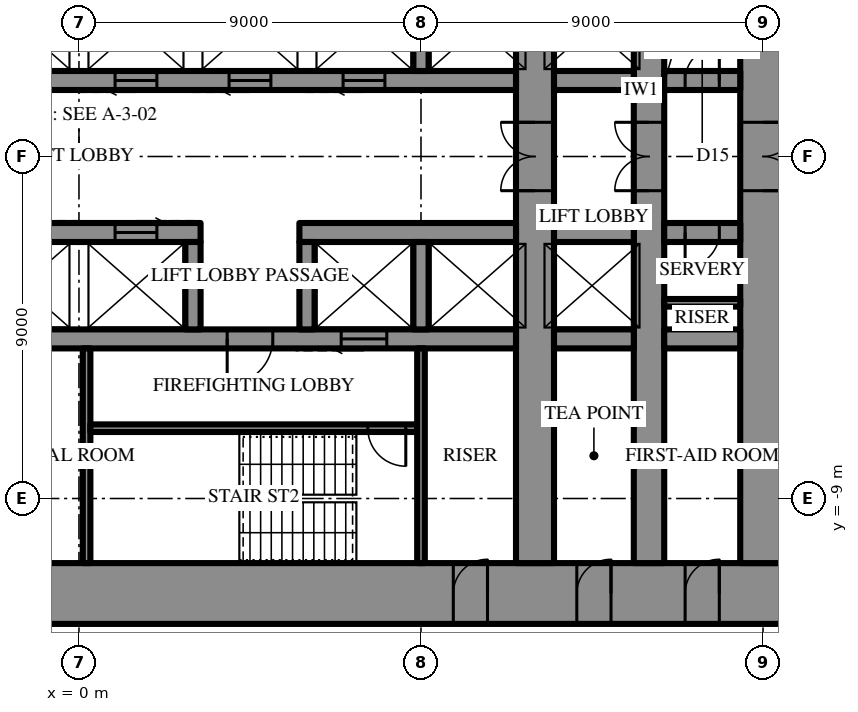
"""IFC4 building model, lengths in metres.
Left out: names, types, materials, properties, quantities, classifications, styles, units other than length and angle.
Written with IfcOpenShell. Run it as: python <this file> out.ifc"""

import sys

from ifc_helpers import new_model, si_unit, direction, frame, frame_2d, origin, place, context, subcontext, project, spatial, rectangle, extrude, element, fill, save


model = new_model("IFC4")
c1 = context("Model", 3, precision=1e-05, world=origin(), true_north=direction((0.0, 1.0)))
c2 = subcontext(c1, "Body", "Model", "MODEL_VIEW")
j1 = project(units=[si_unit("LENGTHUNIT", "METRE"), si_unit("PLANEANGLEUNIT", "RADIAN")], contexts=[c1])
p1 = place(None, origin())
s1 = spatial("IfcSite", under=j1, at=p1, CompositionType="ELEMENT")
p2 = place(p1, origin())
s2 = spatial("IfcBuilding", under=s1, at=p2, CompositionType="ELEMENT")
p3 = place(p2, frame((0.0, 0.0, 199.3)))
s3 = spatial("IfcBuildingStorey", under=s2, at=p3, CompositionType="ELEMENT", Elevation=199.3)
p4 = place(p3, frame((18.6, -11.5, 0.0), z_axis=(0.0, 0.0, 1.0), x_axis=(-1.0, 0.0, 0.0)))
e1 = element("IfcWall", 1, at=p4, inside=s3, PredefinedType="SHEAR", context=c2, shape_type="SweptSolid", body=[
    extrude(rectangle(XDim=37.2, YDim=1.6, at=frame_2d((18.6, 0.0))), origin(), (0.0, 0.0, 1.0), 4.2),
])
p5 = place(p4, frame((19.45, 0.0, 0.0)))
e2 = element("IfcOpeningElement", 2, at=p5, cuts=e1, PredefinedType="OPENING", context=c2, shape_type="SweptSolid", body=[
    extrude(rectangle(XDim=0.9, YDim=2.2, at=frame_2d((0.45, 1.1))), frame((0.0, 0.81, 0.0), z_axis=(0.0, -1.0, 0.0), x_axis=(1.0, 0.0, 0.0)), (0.0, 0.0, 1.0), 1.62),
])
p6 = place(p4, frame((22.45, 0.0, 0.0)))
e3 = element("IfcOpeningElement", 3, at=p6, cuts=e1, PredefinedType="OPENING", context=c2, shape_type="SweptSolid", body=[
    extrude(rectangle(XDim=0.9, YDim=2.2, at=frame_2d((0.45, 1.1))), frame((0.0, 0.81, 0.0), z_axis=(0.0, -1.0, 0.0), x_axis=(1.0, 0.0, 0.0)), (0.0, 0.0, 1.0), 1.62),
])
p7 = place(p4, frame((25.5, 0.0, 0.0)))
e4 = element("IfcOpeningElement", 4, at=p7, cuts=e1, PredefinedType="OPENING", context=c2, shape_type="SweptSolid", body=[
    extrude(rectangle(XDim=1.0, YDim=2.2, at=frame_2d((0.5, 1.1))), frame((0.0, 0.81, 0.0), z_axis=(0.0, -1.0, 0.0), x_axis=(1.0, 0.0, 0.0)), (0.0, 0.0, 1.0), 1.62),
])
p8 = place(p4, frame((1.75, 0.0, 0.0)))
e5 = element("IfcOpeningElement", 5, at=p8, cuts=e1, PredefinedType="OPENING", context=c2, shape_type="SweptSolid", body=[
    extrude(rectangle(XDim=0.9, YDim=2.2, at=frame_2d((0.45, 1.1))), frame((0.0, 0.81, 0.0), z_axis=(0.0, -1.0, 0.0), x_axis=(1.0, 0.0, 0.0)), (0.0, 0.0, 1.0), 1.62),
])
p9 = place(p4, frame((4.6, 0.0, 0.0)))
e6 = element("IfcOpeningElement", 6, at=p9, cuts=e1, PredefinedType="OPENING", context=c2, shape_type="SweptSolid", body=[
    extrude(rectangle(XDim=0.9, YDim=2.2, at=frame_2d((0.45, 1.1))), frame((0.0, 0.81, 0.0), z_axis=(0.0, -1.0, 0.0), x_axis=(1.0, 0.0, 0.0)), (0.0, 0.0, 1.0), 1.62),
])
p10 = place(p4, frame((7.85, 0.0, 0.0)))
e7 = element("IfcOpeningElement", 7, at=p10, cuts=e1, PredefinedType="OPENING", context=c2, shape_type="SweptSolid", body=[
    extrude(rectangle(XDim=0.9, YDim=2.2, at=frame_2d((0.45, 1.1))), frame((0.0, 0.81, 0.0), z_axis=(0.0, -1.0, 0.0), x_axis=(1.0, 0.0, 0.0)), (0.0, 0.0, 1.0), 1.62),
])
p11 = place(p4, frame((28.45, 0.0, 0.0)))
e8 = element("IfcOpeningElement", 8, at=p11, cuts=e1, PredefinedType="OPENING", context=c2, shape_type="SweptSolid", body=[
    extrude(rectangle(XDim=0.9, YDim=2.2, at=frame_2d((0.45, 1.1))), frame((0.0, 0.81, 0.0), z_axis=(0.0, -1.0, 0.0), x_axis=(1.0, 0.0, 0.0)), (0.0, 0.0, 1.0), 1.62),
])
p12 = place(p4, frame((31.7, 0.0, 0.0)))
e9 = element("IfcOpeningElement", 9, at=p12, cuts=e1, PredefinedType="OPENING", context=c2, shape_type="SweptSolid", body=[
    extrude(rectangle(XDim=0.9, YDim=2.2, at=frame_2d((0.45, 1.1))), frame((0.0, 0.81, 0.0), z_axis=(0.0, -1.0, 0.0), x_axis=(1.0, 0.0, 0.0)), (0.0, 0.0, 1.0), 1.62),
])
p13 = place(p4, frame((34.55, 0.0, 0.0)))
e10 = element("IfcOpeningElement", 10, at=p13, cuts=e1, PredefinedType="OPENING", context=c2, shape_type="SweptSolid", body=[
    extrude(rectangle(XDim=0.9, YDim=2.2, at=frame_2d((0.45, 1.1))), frame((0.0, 0.81, 0.0), z_axis=(0.0, -1.0, 0.0), x_axis=(1.0, 0.0, 0.0)), (0.0, 0.0, 1.0), 1.62),
])
p14 = place(p3, frame((18.0, -10.7, 0.0), z_axis=(0.0, 0.0, 1.0), x_axis=(0.0, 1.0, 0.0)))
e11 = element("IfcWall", 11, at=p14, inside=s3, PredefinedType="SHEAR", context=c2, shape_type="SweptSolid", body=[
    extrude(rectangle(XDim=21.4, YDim=1.2, at=frame_2d((10.7, 0.0))), origin(), (0.0, 0.0, 1.0), 4.2),
])
p15 = place(p14, frame((9.8, 0.0, 0.0)))
e12 = element("IfcOpeningElement", 12, at=p15, cuts=e11, PredefinedType="OPENING", context=c2, shape_type="SweptSolid", body=[
    extrude(rectangle(XDim=1.8, YDim=2.4, at=frame_2d((0.9, 1.2))), frame((0.0, 0.61, 0.0), z_axis=(0.0, -1.0, 0.0), x_axis=(1.0, 0.0, 0.0)), (0.0, 0.0, 1.0), 1.22),
])
p16 = place(p3, frame((12.0, -10.7, 0.0), z_axis=(0.0, 0.0, 1.0), x_axis=(0.0, 1.0, 0.0)))
e13 = element("IfcWall", 13, at=p16, inside=s3, PredefinedType="SHEAR", context=c2, shape_type="SweptSolid", body=[
    extrude(rectangle(XDim=21.4, YDim=1.0, at=frame_2d((10.7, 0.0))), origin(), (0.0, 0.0, 1.0), 4.2),
])
p17 = place(p16, frame((9.8, 0.0, 0.0)))
e14 = element("IfcOpeningElement", 14, at=p17, cuts=e13, PredefinedType="OPENING", context=c2, shape_type="SweptSolid", body=[
    extrude(rectangle(XDim=1.8, YDim=2.4, at=frame_2d((0.9, 1.2))), frame((0.0, 0.51, 0.0), z_axis=(0.0, -1.0, 0.0), x_axis=(1.0, 0.0, 0.0)), (0.0, 0.0, 1.0), 1.02),
])
p18 = place(p3, frame((15.0, -10.7, 0.0), z_axis=(0.0, 0.0, 1.0), x_axis=(0.0, 1.0, 0.0)))
e15 = element("IfcWall", 15, at=p18, inside=s3, PredefinedType="SHEAR", context=c2, shape_type="SweptSolid", body=[
    extrude(rectangle(XDim=21.4, YDim=0.8, at=frame_2d((10.7, 0.0))), origin(), (0.0, 0.0, 1.0), 4.2),
])
p19 = place(p18, frame((9.8, 0.0, 0.0)))
e16 = element("IfcOpeningElement", 16, at=p19, cuts=e15, PredefinedType="OPENING", context=c2, shape_type="SweptSolid", body=[
    extrude(rectangle(XDim=1.8, YDim=2.4, at=frame_2d((0.9, 1.2))), frame((0.0, 0.41, 0.0), z_axis=(0.0, -1.0, 0.0), x_axis=(1.0, 0.0, 0.0)), (0.0, 0.0, 1.0), 0.82),
])
p20 = place(p3, frame((-3.2, 2.0, 0.0), z_axis=(0.0, 0.0, 1.0), x_axis=(1.0, 0.0, 0.0)))
e17 = element("IfcWall", 17, at=p20, inside=s3, PredefinedType="SHEAR", context=c2, shape_type="SweptSolid", body=[
    extrude(rectangle(XDim=14.7, YDim=0.5, at=frame_2d((7.35, 0.0))), origin(), (0.0, 0.0, 1.0), 4.2),
])
p21 = place(p20, frame((1.15, 0.0, 0.0)))
e18 = element("IfcOpeningElement", 18, at=p21, cuts=e17, PredefinedType="OPENING", context=c2, shape_type="SweptSolid", body=[
    extrude(rectangle(XDim=1.1, YDim=2.2, at=frame_2d((0.55, 1.1))), frame((0.0, 0.26, 0.0), z_axis=(0.0, -1.0, 0.0), x_axis=(1.0, 0.0, 0.0)), (0.0, 0.0, 1.0), 0.52),
])
p22 = place(p20, frame((4.15, 0.0, 0.0)))
e19 = element("IfcOpeningElement", 19, at=p22, cuts=e17, PredefinedType="OPENING", context=c2, shape_type="SweptSolid", body=[
    extrude(rectangle(XDim=1.1, YDim=2.2, at=frame_2d((0.55, 1.1))), frame((0.0, 0.26, 0.0), z_axis=(0.0, -1.0, 0.0), x_axis=(1.0, 0.0, 0.0)), (0.0, 0.0, 1.0), 0.52),
])
p23 = place(p20, frame((7.15, 0.0, 0.0)))
e20 = element("IfcOpeningElement", 20, at=p23, cuts=e17, PredefinedType="OPENING", context=c2, shape_type="SweptSolid", body=[
    extrude(rectangle(XDim=1.1, YDim=2.2, at=frame_2d((0.55, 1.1))), frame((0.0, 0.26, 0.0), z_axis=(0.0, -1.0, 0.0), x_axis=(1.0, 0.0, 0.0)), (0.0, 0.0, 1.0), 0.52),
])
p24 = place(p20, frame((10.15, 0.0, 0.0)))
e21 = element("IfcOpeningElement", 21, at=p24, cuts=e17, PredefinedType="OPENING", context=c2, shape_type="SweptSolid", body=[
    extrude(rectangle(XDim=1.1, YDim=2.2, at=frame_2d((0.55, 1.1))), frame((0.0, 0.26, 0.0), z_axis=(0.0, -1.0, 0.0), x_axis=(1.0, 0.0, 0.0)), (0.0, 0.0, 1.0), 0.52),
])
p25 = place(p3, frame((12.5, 2.0, 0.0), z_axis=(0.0, 0.0, 1.0), x_axis=(1.0, 0.0, 0.0)))
e22 = element("IfcWall", 22, at=p25, inside=s3, PredefinedType="SHEAR", context=c2, shape_type="SweptSolid", body=[
    extrude(rectangle(XDim=2.1, YDim=0.5, at=frame_2d((1.05, 0.0))), origin(), (0.0, 0.0, 1.0), 4.2),
])
p26 = place(p3, frame((15.4, 2.0, 0.0), z_axis=(0.0, 0.0, 1.0), x_axis=(1.0, 0.0, 0.0)))
e23 = element("IfcWall", 23, at=p26, inside=s3, PredefinedType="SHEAR", context=c2, shape_type="SweptSolid", body=[
    extrude(rectangle(XDim=2.0, YDim=0.5, at=frame_2d((1.0, 0.0))), origin(), (0.0, 0.0, 1.0), 4.2),
])
p27 = place(p26, frame((0.55, 0.0, 0.0)))
e24 = element("IfcOpeningElement", 24, at=p27, cuts=e23, PredefinedType="OPENING", context=c2, shape_type="SweptSolid", body=[
    extrude(rectangle(XDim=0.9, YDim=2.2, at=frame_2d((0.45, 1.1))), frame((0.0, 0.26, 0.0), z_axis=(0.0, -1.0, 0.0), x_axis=(1.0, 0.0, 0.0)), (0.0, 0.0, 1.0), 0.52),
])
p28 = place(p3, frame((9.0, 2.25, 0.0), z_axis=(0.0, 0.0, 1.0), x_axis=(0.0, 1.0, 0.0)))
e25 = element("IfcWall", 25, at=p28, inside=s3, PredefinedType="SHEAR", context=c2, shape_type="SweptSolid", body=[
    extrude(rectangle(XDim=2.3, YDim=0.4, at=frame_2d((1.15, 0.0))), origin(), (0.0, 0.0, 1.0), 4.2),
])
p29 = place(p3, frame((17.4, -2.0, 0.0), z_axis=(0.0, 0.0, 1.0), x_axis=(-1.0, 0.0, 0.0)))
e26 = element("IfcWall", 26, at=p29, inside=s3, PredefinedType="SHEAR", context=c2, shape_type="SweptSolid", body=[
    extrude(rectangle(XDim=2.0, YDim=0.5, at=frame_2d((1.0, 0.0))), origin(), (0.0, 0.0, 1.0), 4.2),
])
p30 = place(p29, frame((0.55, 0.0, 0.0)))
e27 = element("IfcOpeningElement", 27, at=p30, cuts=e26, PredefinedType="OPENING", context=c2, shape_type="SweptSolid", body=[
    extrude(rectangle(XDim=0.9, YDim=2.2, at=frame_2d((0.45, 1.1))), frame((0.0, 0.26, 0.0), z_axis=(0.0, -1.0, 0.0), x_axis=(1.0, 0.0, 0.0)), (0.0, 0.0, 1.0), 0.52),
])
p31 = place(p3, frame((14.6, -2.0, 0.0), z_axis=(0.0, 0.0, 1.0), x_axis=(-1.0, 0.0, 0.0)))
e28 = element("IfcWall", 28, at=p31, inside=s3, PredefinedType="SHEAR", context=c2, shape_type="SweptSolid", body=[
    extrude(rectangle(XDim=2.1, YDim=0.5, at=frame_2d((1.05, 0.0))), origin(), (0.0, 0.0, 1.0), 4.2),
])
p32 = place(p3, frame((11.5, -2.0, 0.0), z_axis=(0.0, 0.0, 1.0), x_axis=(-1.0, 0.0, 0.0)))
e29 = element("IfcWall", 29, at=p32, inside=s3, PredefinedType="SHEAR", context=c2, shape_type="SweptSolid", body=[
    extrude(rectangle(XDim=5.7, YDim=0.5, at=frame_2d((2.85, 0.0))), origin(), (0.0, 0.0, 1.0), 4.2),
])
p33 = place(p3, frame((3.2, -2.0, 0.0), z_axis=(0.0, 0.0, 1.0), x_axis=(-1.0, 0.0, 0.0)))
e30 = element("IfcWall", 30, at=p33, inside=s3, PredefinedType="SHEAR", context=c2, shape_type="SweptSolid", body=[
    extrude(rectangle(XDim=14.7, YDim=0.5, at=frame_2d((7.35, 0.0))), origin(), (0.0, 0.0, 1.0), 4.2),
])
p34 = place(p33, frame((1.15, 0.0, 0.0)))
e31 = element("IfcOpeningElement", 31, at=p34, cuts=e30, PredefinedType="OPENING", context=c2, shape_type="SweptSolid", body=[
    extrude(rectangle(XDim=1.1, YDim=2.2, at=frame_2d((0.55, 1.1))), frame((0.0, 0.26, 0.0), z_axis=(0.0, -1.0, 0.0), x_axis=(1.0, 0.0, 0.0)), (0.0, 0.0, 1.0), 0.52),
])
p35 = place(p33, frame((4.15, 0.0, 0.0)))
e32 = element("IfcOpeningElement", 32, at=p35, cuts=e30, PredefinedType="OPENING", context=c2, shape_type="SweptSolid", body=[
    extrude(rectangle(XDim=1.1, YDim=2.2, at=frame_2d((0.55, 1.1))), frame((0.0, 0.26, 0.0), z_axis=(0.0, -1.0, 0.0), x_axis=(1.0, 0.0, 0.0)), (0.0, 0.0, 1.0), 0.52),
])
p36 = place(p33, frame((7.15, 0.0, 0.0)))
e33 = element("IfcOpeningElement", 33, at=p36, cuts=e30, PredefinedType="OPENING", context=c2, shape_type="SweptSolid", body=[
    extrude(rectangle(XDim=1.1, YDim=2.2, at=frame_2d((0.55, 1.1))), frame((0.0, 0.26, 0.0), z_axis=(0.0, -1.0, 0.0), x_axis=(1.0, 0.0, 0.0)), (0.0, 0.0, 1.0), 0.52),
])
p37 = place(p33, frame((10.15, 0.0, 0.0)))
e34 = element("IfcOpeningElement", 34, at=p37, cuts=e30, PredefinedType="OPENING", context=c2, shape_type="SweptSolid", body=[
    extrude(rectangle(XDim=1.1, YDim=2.2, at=frame_2d((0.55, 1.1))), frame((0.0, 0.26, 0.0), z_axis=(0.0, -1.0, 0.0), x_axis=(1.0, 0.0, 0.0)), (0.0, 0.0, 1.0), 0.52),
])
p38 = place(p3, frame((17.4, -4.8, 0.0), z_axis=(0.0, 0.0, 1.0), x_axis=(-1.0, 0.0, 0.0)))
e35 = element("IfcWall", 35, at=p38, inside=s3, PredefinedType="SHEAR", context=c2, shape_type="SweptSolid", body=[
    extrude(rectangle(XDim=2.0, YDim=0.5, at=frame_2d((1.0, 0.0))), origin(), (0.0, 0.0, 1.0), 4.2),
])
p39 = place(p3, frame((14.6, -4.8, 0.0), z_axis=(0.0, 0.0, 1.0), x_axis=(-1.0, 0.0, 0.0)))
e36 = element("IfcWall", 36, at=p39, inside=s3, PredefinedType="SHEAR", context=c2, shape_type="SweptSolid", body=[
    extrude(rectangle(XDim=2.1, YDim=0.5, at=frame_2d((1.05, 0.0))), origin(), (0.0, 0.0, 1.0), 4.2),
])
p40 = place(p3, frame((11.5, -4.8, 0.0), z_axis=(0.0, 0.0, 1.0), x_axis=(-1.0, 0.0, 0.0)))
e37 = element("IfcWall", 37, at=p40, inside=s3, PredefinedType="SHEAR", context=c2, shape_type="SweptSolid", body=[
    extrude(rectangle(XDim=23.0, YDim=0.5, at=frame_2d((11.5, 0.0))), origin(), (0.0, 0.0, 1.0), 4.2),
])
p41 = place(p40, frame((6.4, 0.0, 0.0)))
e38 = element("IfcOpeningElement", 38, at=p41, cuts=e37, PredefinedType="OPENING", context=c2, shape_type="SweptSolid", body=[
    extrude(rectangle(XDim=1.2, YDim=2.2, at=frame_2d((0.6, 1.1))), frame((0.0, 0.26, 0.0), z_axis=(0.0, -1.0, 0.0), x_axis=(1.0, 0.0, 0.0)), (0.0, 0.0, 1.0), 0.52),
])
p42 = place(p40, frame((3.4, 0.0, 0.0)))
e39 = element("IfcOpeningElement", 39, at=p42, cuts=e37, PredefinedType="OPENING", context=c2, shape_type="SweptSolid", body=[
    extrude(rectangle(XDim=1.2, YDim=2.2, at=frame_2d((0.6, 1.1))), frame((0.0, 0.26, 0.0), z_axis=(0.0, -1.0, 0.0), x_axis=(1.0, 0.0, 0.0)), (0.0, 0.0, 1.0), 0.52),
])
for number, where, z_axis, x_axis in (
    (40, (9.0, -2.25, 0.0), (0.0, 0.0, 1.0), (0.0, -1.0, 0.0)),
    (41, (6.0, -2.25, 0.0), (0.0, 0.0, 1.0), (0.0, -1.0, 0.0)),
    (42, (3.0, -2.25, 0.0), (0.0, 0.0, 1.0), (0.0, -1.0, 0.0)),
):
    element("IfcWall", number, at=place(p3, frame(where, z_axis=z_axis, x_axis=x_axis)), inside=s3, PredefinedType="SHEAR", context=c2, shape_type="SweptSolid", body=[
        extrude(rectangle(XDim=2.3, YDim=0.4, at=frame_2d((1.15, 0.0))), origin(), (0.0, 0.0, 1.0), 4.2),
    ])
p43 = place(p3, frame((0.2, -5.05, 0.0), z_axis=(0.0, 0.0, 1.0), x_axis=(0.0, -1.0, 0.0)))
e43 = element("IfcWall", 43, at=p43, inside=s3, PredefinedType="SHEAR", context=c2, shape_type="SweptSolid", body=[
    extrude(rectangle(XDim=5.65, YDim=0.2, at=frame_2d((2.825, 0.0))), origin(), (0.0, 0.0, 1.0), 4.2),
])
p44 = place(p3, frame((8.9, -7.15, 0.0), z_axis=(0.0, 0.0, 1.0), x_axis=(-1.0, 0.0, 0.0)))
e44 = element("IfcWall", 44, at=p44, inside=s3, PredefinedType="SHEAR", context=c2, shape_type="SweptSolid", body=[
    extrude(rectangle(XDim=8.6, YDim=0.2, at=frame_2d((4.3, 0.0))), origin(), (0.0, 0.0, 1.0), 4.2),
])
p45 = place(p44, frame((0.3, 0.0, 0.0)))
e45 = element("IfcOpeningElement", 45, at=p45, cuts=e44, PredefinedType="OPENING", context=c2, shape_type="SweptSolid", body=[
    extrude(rectangle(XDim=1.0, YDim=2.2, at=frame_2d((0.5, 1.1))), frame((0.0, 0.11, 0.0), z_axis=(0.0, -1.0, 0.0), x_axis=(1.0, 0.0, 0.0)), (0.0, 0.0, 1.0), 0.22),
])
p46 = place(p3, frame((9.0, -5.05, 0.0), z_axis=(0.0, 0.0, 1.0), x_axis=(0.0, -1.0, 0.0)))
e46 = element("IfcWall", 46, at=p46, inside=s3, PredefinedType="PARTITIONING", context=c2, shape_type="SweptSolid", body=[
    extrude(rectangle(XDim=5.65, YDim=0.2, at=frame_2d((2.825, 0.0))), origin(), (0.0, 0.0, 1.0), 3.9),
])
p47 = place(p3, frame((17.4, -3.85, 0.0), z_axis=(0.0, 0.0, 1.0), x_axis=(-1.0, 0.0, 0.0)))
e47 = element("IfcWall", 47, at=p47, inside=s3, PredefinedType="PARTITIONING", context=c2, shape_type="SweptSolid", body=[
    extrude(rectangle(XDim=2.0, YDim=0.2, at=frame_2d((1.0, 0.0))), origin(), (0.0, 0.0, 1.0), 3.9),
])
p48 = place(p15, frame((1.8, 0.0, 0.0), z_axis=(0.0, 0.0, 1.0), x_axis=(-1.0, 0.0, 0.0)))
e48 = element("IfcDoor", 48, at=p48, inside=s3, OperationType="DOUBLE_DOOR_SINGLE_SWING", PredefinedType="DOOR", context=c2, shape_type="SweptSolid", body=[
    extrude(rectangle(XDim=1.8, YDim=2.4, at=frame_2d((0.9, 1.2))), frame((0.0, 0.025, 0.0), z_axis=(0.0, -1.0, 0.0), x_axis=(1.0, 0.0, 0.0)), (0.0, 0.0, 1.0), 0.05),
])
fill(e12, e48)
p49 = place(p41, origin())
e49 = element("IfcDoor", 49, at=p49, inside=s3, OperationType="SINGLE_SWING_LEFT", PredefinedType="DOOR", context=c2, shape_type="SweptSolid", body=[
    extrude(rectangle(XDim=1.2, YDim=2.2, at=frame_2d((0.6, 1.1))), frame((0.0, 0.025, 0.0), z_axis=(0.0, -1.0, 0.0), x_axis=(1.0, 0.0, 0.0)), (0.0, 0.0, 1.0), 0.05),
])
fill(e38, e49)
p50 = place(p45, origin())
e50 = element("IfcDoor", 50, at=p50, inside=s3, OperationType="SINGLE_SWING_RIGHT", PredefinedType="DOOR", context=c2, shape_type="SweptSolid", body=[
    extrude(rectangle(XDim=1.0, YDim=2.2, at=frame_2d((0.5, 1.1))), frame((0.0, 0.025, 0.0), z_axis=(0.0, -1.0, 0.0), x_axis=(1.0, 0.0, 0.0)), (0.0, 0.0, 1.0), 0.05),
])
fill(e45, e50)
p51 = place(p8, frame((0.9, 0.0, 0.0), z_axis=(0.0, 0.0, 1.0), x_axis=(-1.0, 0.0, 0.0)))
e51 = element("IfcDoor", 51, at=p51, inside=s3, OperationType="SINGLE_SWING_LEFT", PredefinedType="DOOR", context=c2, shape_type="SweptSolid", body=[
    extrude(rectangle(XDim=0.9, YDim=2.2, at=frame_2d((0.45, 1.1))), frame((0.0, 0.025, 0.0), z_axis=(0.0, -1.0, 0.0), x_axis=(1.0, 0.0, 0.0)), (0.0, 0.0, 1.0), 0.05),
])
fill(e5, e51)
p52 = place(p9, frame((0.9, 0.0, 0.0), z_axis=(0.0, 0.0, 1.0), x_axis=(-1.0, 0.0, 0.0)))
e52 = element("IfcDoor", 52, at=p52, inside=s3, OperationType="SINGLE_SWING_LEFT", PredefinedType="DOOR", context=c2, shape_type="SweptSolid", body=[
    extrude(rectangle(XDim=0.9, YDim=2.2, at=frame_2d((0.45, 1.1))), frame((0.0, 0.025, 0.0), z_axis=(0.0, -1.0, 0.0), x_axis=(1.0, 0.0, 0.0)), (0.0, 0.0, 1.0), 0.05),
])
fill(e6, e52)
p53 = place(p10, frame((0.9, 0.0, 0.0), z_axis=(0.0, 0.0, 1.0), x_axis=(-1.0, 0.0, 0.0)))
e53 = element("IfcDoor", 53, at=p53, inside=s3, OperationType="SINGLE_SWING_LEFT", PredefinedType="DOOR", context=c2, shape_type="SweptSolid", body=[
    extrude(rectangle(XDim=0.9, YDim=2.2, at=frame_2d((0.45, 1.1))), frame((0.0, 0.025, 0.0), z_axis=(0.0, -1.0, 0.0), x_axis=(1.0, 0.0, 0.0)), (0.0, 0.0, 1.0), 0.05),
])
fill(e7, e53)
p54 = place(p27, origin())
e54 = element("IfcDoor", 54, at=p54, inside=s3, OperationType="SINGLE_SWING_LEFT", PredefinedType="DOOR", context=c2, shape_type="SweptSolid", body=[
    extrude(rectangle(XDim=0.9, YDim=2.2, at=frame_2d((0.45, 1.1))), frame((0.0, 0.025, 0.0), z_axis=(0.0, -1.0, 0.0), x_axis=(1.0, 0.0, 0.0)), (0.0, 0.0, 1.0), 0.05),
])
fill(e24, e54)
p55 = place(p30, origin())
e55 = element("IfcDoor", 55, at=p55, inside=s3, OperationType="SINGLE_SWING_LEFT", PredefinedType="DOOR", context=c2, shape_type="SweptSolid", body=[
    extrude(rectangle(XDim=0.9, YDim=2.2, at=frame_2d((0.45, 1.1))), frame((0.0, 0.025, 0.0), z_axis=(0.0, -1.0, 0.0), x_axis=(1.0, 0.0, 0.0)), (0.0, 0.0, 1.0), 0.05),
])
fill(e27, e55)
p56 = place(p17, origin())
e56 = element("IfcDoor", 56, at=p56, inside=s3, OperationType="DOUBLE_DOOR_SINGLE_SWING", PredefinedType="DOOR", context=c2, shape_type="SweptSolid", body=[
    extrude(rectangle(XDim=1.8, YDim=2.4, at=frame_2d((0.9, 1.2))), frame((0.0, 0.025, 0.0), z_axis=(0.0, -1.0, 0.0), x_axis=(1.0, 0.0, 0.0)), (0.0, 0.0, 1.0), 0.05),
])
fill(e14, e56)
p57 = place(p19, origin())
e57 = element("IfcDoor", 57, at=p57, inside=s3, OperationType="DOUBLE_DOOR_SINGLE_SWING", PredefinedType="DOOR", context=c2, shape_type="SweptSolid", body=[
    extrude(rectangle(XDim=1.8, YDim=2.4, at=frame_2d((0.9, 1.2))), frame((0.0, 0.025, 0.0), z_axis=(0.0, -1.0, 0.0), x_axis=(1.0, 0.0, 0.0)), (0.0, 0.0, 1.0), 0.05),
])
fill(e16, e57)
p58 = place(p22, frame((1.1, 0.0, 0.0), z_axis=(0.0, 0.0, 1.0), x_axis=(-1.0, 0.0, 0.0)))
e58 = element("IfcDoor", 58, at=p58, inside=s3, OperationType="SLIDING_TO_LEFT", PredefinedType="DOOR", context=c2, shape_type="SweptSolid", body=[
    extrude(rectangle(XDim=1.1, YDim=2.2, at=frame_2d((0.55, 1.1))), frame((0.0, 0.025, 0.0), z_axis=(0.0, -1.0, 0.0), x_axis=(1.0, 0.0, 0.0)), (0.0, 0.0, 1.0), 0.05),
])
fill(e19, e58)
p59 = place(p23, frame((1.1, 0.0, 0.0), z_axis=(0.0, 0.0, 1.0), x_axis=(-1.0, 0.0, 0.0)))
e59 = element("IfcDoor", 59, at=p59, inside=s3, OperationType="SLIDING_TO_LEFT", PredefinedType="DOOR", context=c2, shape_type="SweptSolid", body=[
    extrude(rectangle(XDim=1.1, YDim=2.2, at=frame_2d((0.55, 1.1))), frame((0.0, 0.025, 0.0), z_axis=(0.0, -1.0, 0.0), x_axis=(1.0, 0.0, 0.0)), (0.0, 0.0, 1.0), 0.05),
])
fill(e20, e59)
p60 = place(p24, frame((1.1, 0.0, 0.0), z_axis=(0.0, 0.0, 1.0), x_axis=(-1.0, 0.0, 0.0)))
e60 = element("IfcDoor", 60, at=p60, inside=s3, OperationType="SLIDING_TO_LEFT", PredefinedType="DOOR", context=c2, shape_type="SweptSolid", body=[
    extrude(rectangle(XDim=1.1, YDim=2.2, at=frame_2d((0.55, 1.1))), frame((0.0, 0.025, 0.0), z_axis=(0.0, -1.0, 0.0), x_axis=(1.0, 0.0, 0.0)), (0.0, 0.0, 1.0), 0.05),
])
fill(e21, e60)
p61 = place(p42, origin())
e61 = element("IfcDoor", 61, at=p61, inside=s3, OperationType="SLIDING_TO_LEFT", PredefinedType="DOOR", context=c2, shape_type="SweptSolid", body=[
    extrude(rectangle(XDim=1.2, YDim=2.2, at=frame_2d((0.6, 1.1))), frame((0.0, 0.025, 0.0), z_axis=(0.0, -1.0, 0.0), x_axis=(1.0, 0.0, 0.0)), (0.0, 0.0, 1.0), 0.05),
])
fill(e39, e61)
p62 = place(p34, frame((1.1, 0.0, 0.0), z_axis=(0.0, 0.0, 1.0), x_axis=(-1.0, 0.0, 0.0)))
e62 = element("IfcDoor", 62, at=p62, inside=s3, OperationType="SLIDING_TO_LEFT", PredefinedType="DOOR", context=c2, shape_type="SweptSolid", body=[
    extrude(rectangle(XDim=1.1, YDim=2.2, at=frame_2d((0.55, 1.1))), frame((0.0, 0.025, 0.0), z_axis=(0.0, -1.0, 0.0), x_axis=(1.0, 0.0, 0.0)), (0.0, 0.0, 1.0), 0.05),
])
fill(e31, e62)
save(model, sys.argv[1])
